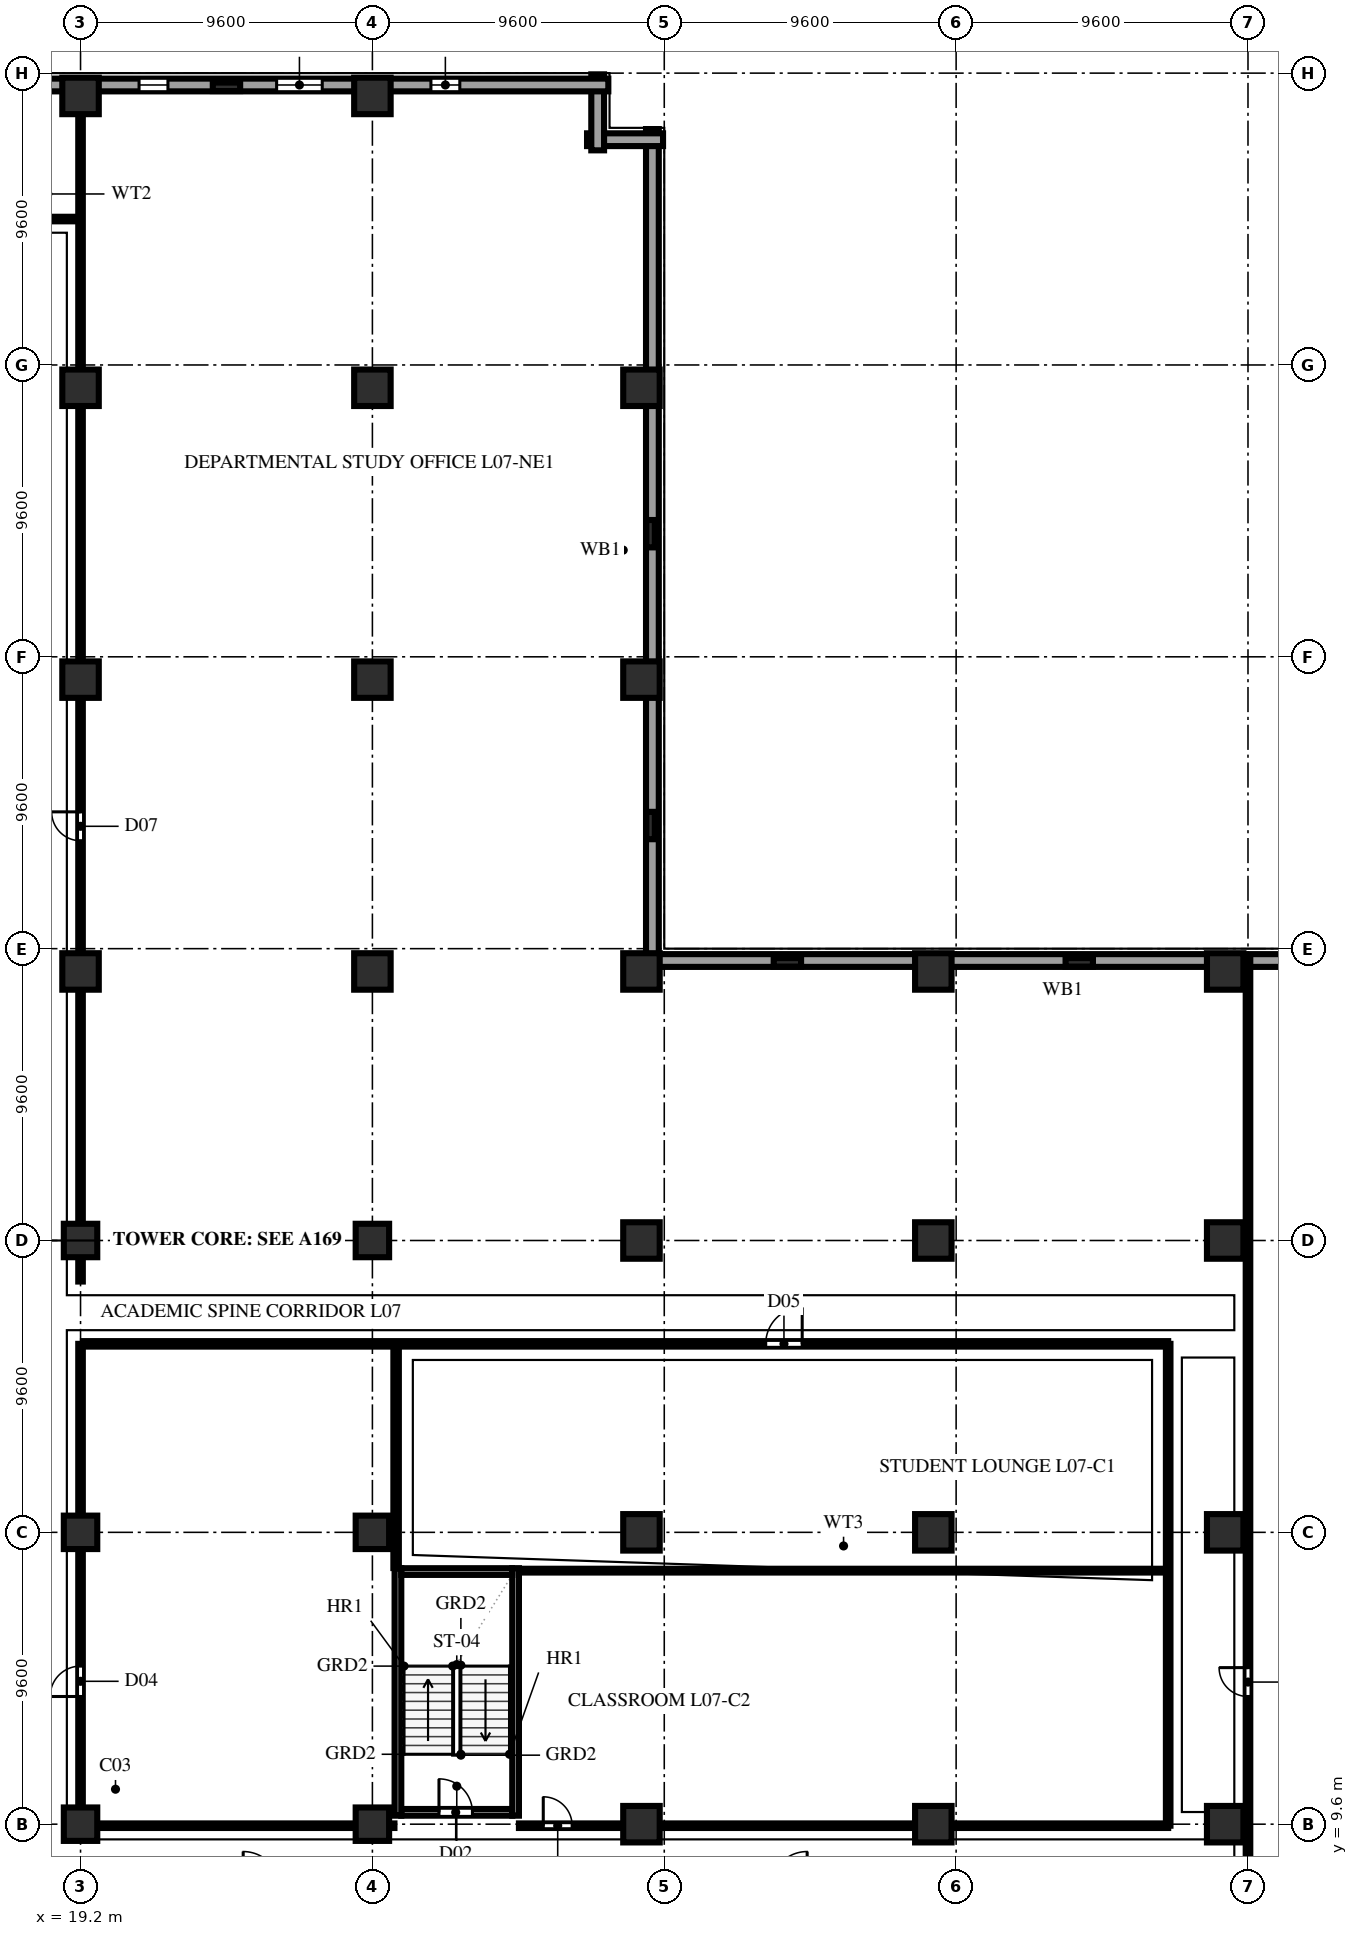
"""IFC4 building model, lengths in metres.
Left out: names, types, materials, properties, quantities, classifications, styles, units other than length and angle.
Written with IfcOpenShell. Run it as: python <this file> out.ifc"""

import sys

from ifc_helpers import new_model, si_unit, direction, frame, frame_2d, origin, origin_2d, place, context, subcontext, project, spatial, rectangle, extrude, element, fill, save


model = new_model("IFC4")
c1 = context("Model", 3, precision=1e-05, world=origin(), true_north=direction((0.0, 1.0)))
c2 = subcontext(c1, "Body", "Model", "MODEL_VIEW")
j1 = project(units=[si_unit("LENGTHUNIT", "METRE"), si_unit("PLANEANGLEUNIT", "RADIAN")], contexts=[c1])
p1 = place(None, origin())
s1 = spatial("IfcSite", under=j1, at=p1, CompositionType="ELEMENT")
p2 = place(p1, origin())
s2 = spatial("IfcBuilding", under=s1, at=p2, CompositionType="ELEMENT")
p3 = place(p2, frame((0.0, 0.0, 31.8)))
s3 = spatial("IfcBuildingStorey", under=s2, at=p3, CompositionType="ELEMENT", Elevation=31.8)
for number, where, z_axis, x_axis in (
    (1, (19.2, 9.6, 0.0), (0.0, 0.0, 1.0), (1.0, 0.0, 0.0)),
    (2, (19.2, 19.2, 0.0), (0.0, 0.0, 1.0), (1.0, 0.0, 0.0)),
    (3, (19.2, 28.8, 0.0), (0.0, 0.0, 1.0), (1.0, 0.0, 0.0)),
):
    element("IfcColumn", number, at=place(p3, frame(where, z_axis=z_axis, x_axis=x_axis)), inside=s3, PredefinedType="COLUMN", context=c2, shape_type="SweptSolid", body=[
        extrude(rectangle(XDim=1.1, YDim=1.1, at=origin_2d()), origin(), (0.0, 0.0, 1.0), 3.8),
    ])
for number, where, z_axis, x_axis in (
    (4, (19.2, 37.65, 0.0), (0.0, 0.0, 1.0), (1.0, 0.0, 0.0)),
    (5, (19.2, 47.25, 0.0), (0.0, 0.0, 1.0), (1.0, 0.0, 0.0)),
    (6, (19.2, 56.85, 0.0), (0.0, 0.0, 1.0), (1.0, 0.0, 0.0)),
    (7, (19.2, 66.45, 0.0), (0.0, 0.0, 1.0), (1.0, 0.0, 0.0)),
):
    element("IfcColumn", number, at=place(p3, frame(where, z_axis=z_axis, x_axis=x_axis)), inside=s3, PredefinedType="COLUMN", context=c2, shape_type="SweptSolid", body=[
        extrude(rectangle(XDim=1.2, YDim=1.2, at=origin_2d()), origin(), (0.0, 0.0, 1.0), 3.8),
    ])
for number, where, z_axis, x_axis in (
    (8, (28.8, 9.6, 0.0), (0.0, 0.0, 1.0), (1.0, 0.0, 0.0)),
    (9, (28.8, 19.2, 0.0), (0.0, 0.0, 1.0), (1.0, 0.0, 0.0)),
    (10, (28.8, 28.8, 0.0), (0.0, 0.0, 1.0), (1.0, 0.0, 0.0)),
):
    element("IfcColumn", number, at=place(p3, frame(where, z_axis=z_axis, x_axis=x_axis)), inside=s3, PredefinedType="COLUMN", context=c2, shape_type="SweptSolid", body=[
        extrude(rectangle(XDim=1.1, YDim=1.1, at=origin_2d()), origin(), (0.0, 0.0, 1.0), 3.8),
    ])
for number, where, z_axis, x_axis in (
    (11, (28.8, 37.65, 0.0), (0.0, 0.0, 1.0), (1.0, 0.0, 0.0)),
    (12, (28.8, 47.25, 0.0), (0.0, 0.0, 1.0), (1.0, 0.0, 0.0)),
    (13, (28.8, 56.85, 0.0), (0.0, 0.0, 1.0), (1.0, 0.0, 0.0)),
    (14, (28.8, 66.45, 0.0), (0.0, 0.0, 1.0), (1.0, 0.0, 0.0)),
    (15, (37.65, 9.6, 0.0), (0.0, 0.0, 1.0), (1.0, 0.0, 0.0)),
    (16, (37.65, 19.2, 0.0), (0.0, 0.0, 1.0), (1.0, 0.0, 0.0)),
    (17, (37.65, 28.8, 0.0), (0.0, 0.0, 1.0), (1.0, 0.0, 0.0)),
    (18, (37.65, 37.65, 0.0), (0.0, 0.0, 1.0), (1.0, 0.0, 0.0)),
    (19, (37.65, 47.25, 0.0), (0.0, 0.0, 1.0), (1.0, 0.0, 0.0)),
    (20, (37.65, 56.85, 0.0), (0.0, 0.0, 1.0), (1.0, 0.0, 0.0)),
    (21, (47.25, 9.6, 0.0), (0.0, 0.0, 1.0), (1.0, 0.0, 0.0)),
    (22, (47.25, 19.2, 0.0), (0.0, 0.0, 1.0), (1.0, 0.0, 0.0)),
    (23, (47.25, 28.8, 0.0), (0.0, 0.0, 1.0), (1.0, 0.0, 0.0)),
    (24, (47.25, 37.65, 0.0), (0.0, 0.0, 1.0), (1.0, 0.0, 0.0)),
    (25, (56.85, 9.6, 0.0), (0.0, 0.0, 1.0), (1.0, 0.0, 0.0)),
    (26, (56.85, 19.2, 0.0), (0.0, 0.0, 1.0), (1.0, 0.0, 0.0)),
    (27, (56.85, 28.8, 0.0), (0.0, 0.0, 1.0), (1.0, 0.0, 0.0)),
    (28, (56.85, 37.65, 0.0), (0.0, 0.0, 1.0), (1.0, 0.0, 0.0)),
):
    element("IfcColumn", number, at=place(p3, frame(where, z_axis=z_axis, x_axis=x_axis)), inside=s3, PredefinedType="COLUMN", context=c2, shape_type="SweptSolid", body=[
        extrude(rectangle(XDim=1.2, YDim=1.2, at=origin_2d()), origin(), (0.0, 0.0, 1.0), 3.8),
    ])
for number, where, z_axis, x_axis in (
    (29, (24.0, 66.75, 0.0), (0.0, 0.0, 1.0), (1.0, 0.0, 0.0)),
    (30, (37.95, 42.45, 0.0), (0.0, 0.0, 1.0), (0.0, 1.0, 0.0)),
    (31, (37.95, 52.05, 0.0), (0.0, 0.0, 1.0), (0.0, 1.0, 0.0)),
    (32, (42.45, 37.95, 0.0), (0.0, 0.0, 1.0), (1.0, 0.0, 0.0)),
    (33, (52.05, 37.95, 0.0), (0.0, 0.0, 1.0), (1.0, 0.0, 0.0)),
):
    element("IfcColumn", number, at=place(p3, frame(where, z_axis=z_axis, x_axis=x_axis)), inside=s3, PredefinedType="PILASTER", context=c2, shape_type="SweptSolid", body=[
        extrude(rectangle(XDim=0.9, YDim=0.28, at=origin_2d()), origin(), (0.0, 0.0, 1.0), 3.8),
    ])
for number, where, z_axis, x_axis in (
    (34, (65.36, 38.01, 0.0), (0.0, 0.0, 1.0), (-1.0, 0.0, 0.0)),
    (35, (38.01, 37.66, 0.0), (0.0, 0.0, 1.0), (0.0, 1.0, 0.0)),
):
    element("IfcWall", number, at=place(p3, frame(where, z_axis=z_axis, x_axis=x_axis)), inside=s3, PredefinedType="SOLIDWALL", context=c2, shape_type="SweptSolid", body=[
        extrude(rectangle(XDim=27.7, YDim=0.42, at=frame_2d((13.85, 0.0))), origin(), (0.0, 0.0, 1.0), 3.54),
    ])
for number, where, z_axis, x_axis in (
    (36, (38.36, 65.01, 0.0), (0.0, 0.0, 1.0), (-1.0, 0.0, 0.0)),
    (37, (36.21, 64.66, 0.0), (0.0, 0.0, 1.0), (0.0, 1.0, 0.0)),
):
    element("IfcWall", number, at=place(p3, frame(where, z_axis=z_axis, x_axis=x_axis)), inside=s3, PredefinedType="SOLIDWALL", context=c2, shape_type="SweptSolid", body=[
        extrude(rectangle(XDim=2.5, YDim=0.42, at=frame_2d((1.25, 0.0))), origin(), (0.0, 0.0, 1.0), 3.54),
    ])
p4 = place(p3, frame((36.56, 66.81, 0.0), z_axis=(0.0, 0.0, 1.0), x_axis=(-1.0, 0.0, 0.0)))
e38 = element("IfcWall", 38, at=p4, inside=s3, PredefinedType="SOLIDWALL", context=c2, shape_type="SweptSolid", body=[
    extrude(rectangle(XDim=34.72, YDim=0.42, at=frame_2d((17.36, 0.0))), origin(), (0.0, 0.0, 1.0), 3.54),
])
p5 = place(p4, frame((4.885, 0.0, 0.9)))
e39 = element("IfcOpeningElement", 39, at=p5, cuts=e38, PredefinedType="OPENING", context=c2, shape_type="SweptSolid", body=[
    extrude(rectangle(XDim=0.95, YDim=1.85, at=frame_2d((0.475, 0.925))), frame((0.0, 0.222, 0.0), z_axis=(0.0, -1.0, 0.0), x_axis=(1.0, 0.0, 0.0)), (0.0, 0.0, 1.0), 0.444),
])
p6 = place(p4, frame((9.41, 0.0, 0.9)))
e40 = element("IfcOpeningElement", 40, at=p6, cuts=e38, PredefinedType="OPENING", context=c2, shape_type="SweptSolid", body=[
    extrude(rectangle(XDim=1.5, YDim=1.85, at=frame_2d((0.75, 0.925))), frame((0.0, 0.222, 0.0), z_axis=(0.0, -1.0, 0.0), x_axis=(1.0, 0.0, 0.0)), (0.0, 0.0, 1.0), 0.444),
])
p7 = place(p4, frame((14.485, 0.0, 0.9)))
e41 = element("IfcOpeningElement", 41, at=p7, cuts=e38, PredefinedType="OPENING", context=c2, shape_type="SweptSolid", body=[
    extrude(rectangle(XDim=0.95, YDim=1.85, at=frame_2d((0.475, 0.925))), frame((0.0, 0.222, 0.0), z_axis=(0.0, -1.0, 0.0), x_axis=(1.0, 0.0, 0.0)), (0.0, 0.0, 1.0), 0.444),
])
p8 = place(p3, frame((29.75, 9.99, 0.0), z_axis=(0.0, 0.0, 1.0), x_axis=(1.0, 0.0, 0.0)))
e42 = element("IfcWall", 42, at=p8, inside=s3, PredefinedType="SOLIDWALL", context=c2, shape_type="SweptSolid", body=[
    extrude(rectangle(XDim=3.65, YDim=0.22, at=frame_2d((1.825, 0.0))), origin(), (0.0, 0.0, 1.0), 3.54),
])
p9 = place(p8, frame((1.24, 0.0, 0.0)))
e43 = element("IfcOpeningElement", 43, at=p9, cuts=e42, PredefinedType="OPENING", context=c2, shape_type="SweptSolid", body=[
    extrude(rectangle(XDim=1.1, YDim=2.2, at=frame_2d((0.55, 1.1))), frame((0.0, 0.122, 0.0), z_axis=(0.0, -1.0, 0.0), x_axis=(1.0, 0.0, 0.0)), (0.0, 0.0, 1.0), 0.244),
])
for number, where, z_axis, x_axis in (
    (44, (29.64, 9.88, 0.0), (0.0, 0.0, 1.0), (0.0, 1.0, 0.0)),
    (45, (33.51, 9.88, 0.0), (0.0, 0.0, 1.0), (0.0, 1.0, 0.0)),
):
    element("IfcWall", number, at=place(p3, frame(where, z_axis=z_axis, x_axis=x_axis)), inside=s3, PredefinedType="SOLIDWALL", context=c2, shape_type="SweptSolid", body=[
        extrude(rectangle(XDim=8.14, YDim=0.22, at=frame_2d((4.07, 0.0))), origin(), (0.0, 0.0, 1.0), 3.54),
    ])
p10 = place(p3, frame((29.75, 17.91, 0.0), z_axis=(0.0, 0.0, 1.0), x_axis=(1.0, 0.0, 0.0)))
e46 = element("IfcWall", 46, at=p10, inside=s3, PredefinedType="SOLIDWALL", context=c2, shape_type="SweptSolid", body=[
    extrude(rectangle(XDim=3.65, YDim=0.22, at=frame_2d((1.825, 0.0))), origin(), (0.0, 0.0, 1.0), 3.54),
])
p11 = place(p3, frame((17.05, 62.4, 0.0), z_axis=(0.0, 0.0, 1.0), x_axis=(1.0, 0.0, 0.0)))
e47 = element("IfcWall", 47, at=p11, inside=s3, PredefinedType="PARTITIONING", context=c2, shape_type="SweptSolid", body=[
    extrude(rectangle(XDim=2.15, YDim=0.15, at=frame_2d((1.075, 0.0))), origin(), (0.0, 0.0, 1.0), 3.54),
])
p12 = place(p3, frame((57.6, 0.22, 0.0), z_axis=(0.0, 0.0, 1.0), x_axis=(0.0, 1.0, 0.0)))
e48 = element("IfcWall", 48, at=p12, inside=s3, PredefinedType="PARTITIONING", context=c2, shape_type="SweptSolid", body=[
    extrude(rectangle(XDim=37.96, YDim=0.15, at=frame_2d((18.98, 0.0))), origin(), (0.0, 0.0, 1.0), 3.54),
])
p13 = place(p12, frame((13.58, 0.0, 0.0)))
e49 = element("IfcOpeningElement", 49, at=p13, cuts=e48, PredefinedType="OPENING", context=c2, shape_type="SweptSolid", body=[
    extrude(rectangle(XDim=0.95, YDim=2.15, at=frame_2d((0.475, 1.075))), frame((0.0, 0.087, 0.0), z_axis=(0.0, -1.0, 0.0), x_axis=(1.0, 0.0, 0.0)), (0.0, 0.0, 1.0), 0.174),
])
p14 = place(p3, frame((19.2, 9.55, 0.0), z_axis=(0.0, 0.0, 1.0), x_axis=(0.0, 1.0, 0.0)))
e50 = element("IfcWall", 50, at=p14, inside=s3, PredefinedType="PARTITIONING", context=c2, shape_type="SweptSolid", body=[
    extrude(rectangle(XDim=15.85, YDim=0.15, at=frame_2d((7.925, 0.0))), origin(), (0.0, 0.0, 1.0), 2.923),
])
p15 = place(p14, frame((4.25, 0.0, 0.0)))
e51 = element("IfcOpeningElement", 51, at=p15, cuts=e50, PredefinedType="OPENING", context=c2, shape_type="SweptSolid", body=[
    extrude(rectangle(XDim=1.0, YDim=2.2, at=frame_2d((0.5, 1.1))), frame((0.0, 0.087, 0.0), z_axis=(0.0, -1.0, 0.0), x_axis=(1.0, 0.0, 0.0)), (0.0, 0.0, 1.0), 0.174),
])
p16 = place(p3, frame((29.58, 18.025, 0.0), z_axis=(0.0, 0.0, 1.0), x_axis=(0.0, 1.0, 0.0)))
e52 = element("IfcWall", 52, at=p16, inside=s3, PredefinedType="PARTITIONING", context=c2, shape_type="SweptSolid", body=[
    extrude(rectangle(XDim=7.28, YDim=0.18, at=frame_2d((3.64, 0.0))), origin(), (0.0, 0.0, 1.0), 3.54),
])
p17 = place(p3, frame((19.28, 25.4, 0.0), z_axis=(0.0, 0.0, 1.0), x_axis=(1.0, 0.0, 0.0)))
e53 = element("IfcWall", 53, at=p17, inside=s3, PredefinedType="PARTITIONING", context=c2, shape_type="SweptSolid", body=[
    extrude(rectangle(XDim=35.695, YDim=0.18, at=frame_2d((17.848, 0.0))), origin(), (0.0, 0.0, 1.0), 3.54),
])
p18 = place(p17, frame((22.457, 0.0, 0.0)))
e54 = element("IfcOpeningElement", 54, at=p18, cuts=e53, PredefinedType="OPENING", context=c2, shape_type="SweptSolid", body=[
    extrude(rectangle(XDim=1.2, YDim=2.2, at=frame_2d((0.6, 1.1))), frame((0.0, 0.102, 0.0), z_axis=(0.0, -1.0, 0.0), x_axis=(1.0, 0.0, 0.0)), (0.0, 0.0, 1.0), 0.204),
])
p19 = place(p3, frame((19.28, 9.55, 0.0), z_axis=(0.0, 0.0, 1.0), x_axis=(1.0, 0.0, 0.0)))
e55 = element("IfcWall", 55, at=p19, inside=s3, PredefinedType="PARTITIONING", context=c2, shape_type="SweptSolid", body=[
    extrude(rectangle(XDim=10.245, YDim=0.15, at=frame_2d((5.123, 0.0))), origin(), (0.0, 0.0, 1.0), 2.923),
])
p20 = place(p3, frame((33.62, 17.94, 0.0), z_axis=(0.0, 0.0, 1.0), x_axis=(1.0, 0.0, 0.0)))
e56 = element("IfcWall", 56, at=p20, inside=s3, PredefinedType="PARTITIONING", context=c2, shape_type="SweptSolid", body=[
    extrude(rectangle(XDim=21.355, YDim=0.125, at=frame_2d((10.677, 0.0))), origin(), (0.0, 0.0, 1.0), 3.54),
])
p21 = place(p3, frame((33.62, 9.55, 0.0), z_axis=(0.0, 0.0, 1.0), x_axis=(1.0, 0.0, 0.0)))
e57 = element("IfcWall", 57, at=p21, inside=s3, PredefinedType="PARTITIONING", context=c2, shape_type="SweptSolid", body=[
    extrude(rectangle(XDim=21.355, YDim=0.15, at=frame_2d((10.677, 0.0))), origin(), (0.0, 0.0, 1.0), 2.923),
])
p22 = place(p21, frame((0.8, 0.0, 0.0)))
e58 = element("IfcOpeningElement", 58, at=p22, cuts=e57, PredefinedType="OPENING", context=c2, shape_type="SweptSolid", body=[
    extrude(rectangle(XDim=0.95, YDim=2.15, at=frame_2d((0.475, 1.075))), frame((0.0, 0.087, 0.0), z_axis=(0.0, -1.0, 0.0), x_axis=(1.0, 0.0, 0.0)), (0.0, 0.0, 1.0), 0.174),
])
p23 = place(p3, frame((54.975, 9.55, 0.0), z_axis=(0.0, 0.0, 1.0), x_axis=(0.0, 1.0, 0.0)))
e59 = element("IfcWall", 59, at=p23, inside=s3, PredefinedType="PARTITIONING", context=c2, shape_type="SweptSolid", body=[
    extrude(rectangle(XDim=15.85, YDim=0.15, at=frame_2d((7.925, 0.0))), origin(), (0.0, 0.0, 1.0), 3.54),
])
p24 = place(p3, frame((19.2, 27.45, 0.0), z_axis=(0.0, 0.0, 1.0), x_axis=(0.0, 1.0, 0.0)))
e60 = element("IfcWall", 60, at=p24, inside=s3, PredefinedType="PARTITIONING", context=c2, shape_type="SweptSolid", body=[
    extrude(rectangle(XDim=39.0, YDim=0.15, at=frame_2d((19.5, 0.0))), origin(), (0.0, 0.0, 1.0), 2.923),
])
p25 = place(p24, frame((14.5, 0.0, 0.0)))
e61 = element("IfcOpeningElement", 61, at=p25, cuts=e60, PredefinedType="OPENING", context=c2, shape_type="SweptSolid", body=[
    extrude(rectangle(XDim=0.95, YDim=2.15, at=frame_2d((0.475, 1.075))), frame((0.0, 0.087, 0.0), z_axis=(0.0, -1.0, 0.0), x_axis=(1.0, 0.0, 0.0)), (0.0, 0.0, 1.0), 0.174),
])
p26 = place(p3, frame((19.2, 66.45, 0.0), z_axis=(0.0, 0.0, 1.0), x_axis=(0.0, 1.0, 0.0)))
e62 = element("IfcWall", 62, at=p26, inside=s3, PredefinedType="PARTITIONING", context=c2, shape_type="SweptSolid", body=[
    extrude(rectangle(XDim=0.53, YDim=0.15, at=frame_2d((0.265, 0.0))), origin(), (0.0, 0.0, 1.0), 3.54),
])
p27 = place(p5, origin())
e63 = element("IfcWindow", 63, at=p27, inside=s3, PartitioningType="SINGLE_PANEL", PredefinedType="WINDOW", context=c2, shape_type="SweptSolid", body=[
    extrude(rectangle(XDim=0.95, YDim=1.85, at=frame_2d((0.475, 0.925))), frame((0.0, 0.11, 0.0), z_axis=(0.0, -1.0, 0.0), x_axis=(1.0, 0.0, 0.0)), (0.0, 0.0, 1.0), 0.06),
])
fill(e39, e63)
p28 = place(p6, origin())
e64 = element("IfcWindow", 64, at=p28, inside=s3, PartitioningType="DOUBLE_PANEL_VERTICAL", PredefinedType="WINDOW", context=c2, shape_type="SweptSolid", body=[
    extrude(rectangle(XDim=1.5, YDim=1.85, at=frame_2d((0.75, 0.925))), frame((0.0, 0.11, 0.0), z_axis=(0.0, -1.0, 0.0), x_axis=(1.0, 0.0, 0.0)), (0.0, 0.0, 1.0), 0.06),
])
fill(e40, e64)
p29 = place(p7, origin())
e65 = element("IfcWindow", 65, at=p29, inside=s3, PartitioningType="SINGLE_PANEL", PredefinedType="WINDOW", context=c2, shape_type="SweptSolid", body=[
    extrude(rectangle(XDim=0.95, YDim=1.85, at=frame_2d((0.475, 0.925))), frame((0.0, 0.11, 0.0), z_axis=(0.0, -1.0, 0.0), x_axis=(1.0, 0.0, 0.0)), (0.0, 0.0, 1.0), 0.06),
])
fill(e41, e65)
p30 = place(p9, origin())
e66 = element("IfcDoor", 66, at=p30, inside=s3, OperationType="SINGLE_SWING_LEFT", PredefinedType="DOOR", context=c2, shape_type="SweptSolid", body=[
    extrude(rectangle(XDim=1.1, YDim=2.2, at=frame_2d((0.55, 1.1))), frame((0.0, 0.025, 0.0), z_axis=(0.0, -1.0, 0.0), x_axis=(1.0, 0.0, 0.0)), (0.0, 0.0, 1.0), 0.05),
])
fill(e43, e66)
p31 = place(p13, origin())
e67 = element("IfcDoor", 67, at=p31, inside=s3, OperationType="SINGLE_SWING_RIGHT", PredefinedType="DOOR", context=c2, shape_type="SweptSolid", body=[
    extrude(rectangle(XDim=0.95, YDim=2.15, at=frame_2d((0.475, 1.075))), frame((0.0, 0.025, 0.0), z_axis=(0.0, -1.0, 0.0), x_axis=(1.0, 0.0, 0.0)), (0.0, 0.0, 1.0), 0.05),
])
fill(e49, e67)
p32 = place(p15, origin())
e68 = element("IfcDoor", 68, at=p32, inside=s3, OperationType="SINGLE_SWING_LEFT", PredefinedType="DOOR", context=c2, shape_type="SweptSolid", body=[
    extrude(rectangle(XDim=1.0, YDim=2.2, at=frame_2d((0.5, 1.1))), frame((0.0, 0.025, 0.0), z_axis=(0.0, -1.0, 0.0), x_axis=(1.0, 0.0, 0.0)), (0.0, 0.0, 1.0), 0.05),
])
fill(e51, e68)
p33 = place(p18, origin())
e69 = element("IfcDoor", 69, at=p33, inside=s3, OperationType="SINGLE_SWING_RIGHT", PredefinedType="DOOR", context=c2, shape_type="SweptSolid", body=[
    extrude(rectangle(XDim=1.2, YDim=2.2, at=frame_2d((0.6, 1.1))), frame((0.0, 0.025, 0.0), z_axis=(0.0, -1.0, 0.0), x_axis=(1.0, 0.0, 0.0)), (0.0, 0.0, 1.0), 0.05),
])
fill(e54, e69)
p34 = place(p22, origin())
e70 = element("IfcDoor", 70, at=p34, inside=s3, OperationType="SINGLE_SWING_LEFT", PredefinedType="DOOR", context=c2, shape_type="SweptSolid", body=[
    extrude(rectangle(XDim=0.95, YDim=2.15, at=frame_2d((0.475, 1.075))), frame((0.0, 0.025, 0.0), z_axis=(0.0, -1.0, 0.0), x_axis=(1.0, 0.0, 0.0)), (0.0, 0.0, 1.0), 0.05),
])
fill(e58, e70)
p35 = place(p25, origin())
e71 = element("IfcDoor", 71, at=p35, inside=s3, OperationType="SINGLE_SWING_RIGHT", PredefinedType="DOOR", context=c2, shape_type="SweptSolid", body=[
    extrude(rectangle(XDim=0.95, YDim=2.15, at=frame_2d((0.475, 1.075))), frame((0.0, 0.025, 0.0), z_axis=(0.0, -1.0, 0.0), x_axis=(1.0, 0.0, 0.0)), (0.0, 0.0, 1.0), 0.05),
])
fill(e61, e71)
save(model, sys.argv[1])
